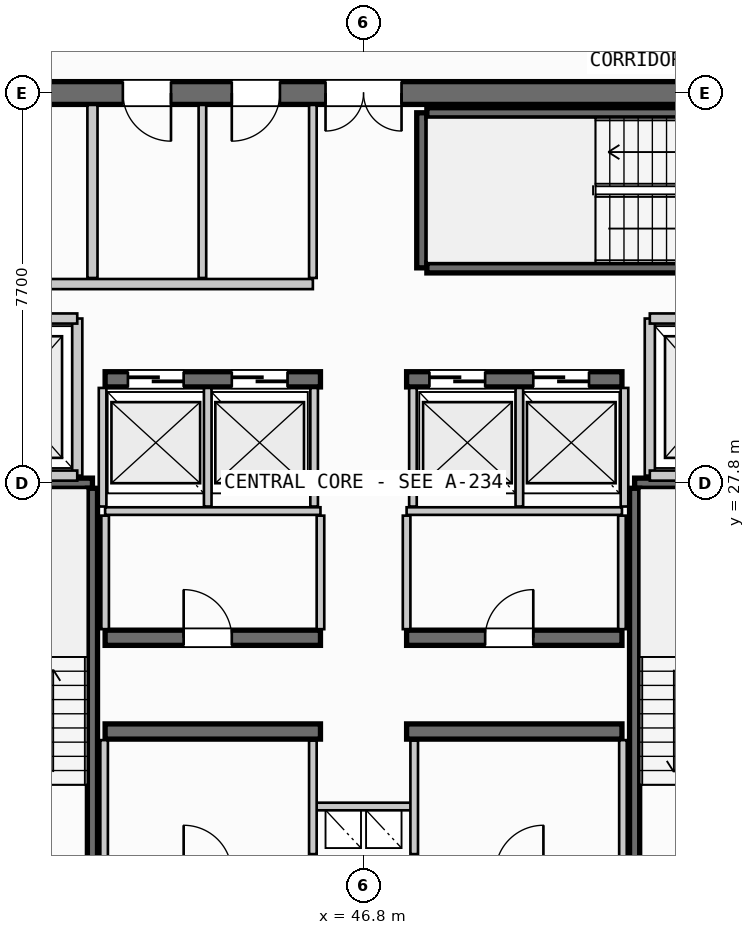
"""IFC4 building model, lengths in metres.
Left out: names, types, materials, properties, quantities, classifications, styles, units other than length and angle.
Written with IfcOpenShell. Run it as: python <this file> out.ifc"""

import sys

from ifc_helpers import new_model, si_unit, direction, frame, frame_2d, origin, place, context, subcontext, project, spatial, rectangle, extrude, source, transform, mapped, element, fill, save


model = new_model("IFC4")
c1 = context("Model", 3, precision=1e-05, world=origin(), true_north=direction((0.0, 1.0)))
c2 = subcontext(c1, "Body", "Model", "MODEL_VIEW")
j1 = project(units=[si_unit("LENGTHUNIT", "METRE"), si_unit("PLANEANGLEUNIT", "RADIAN")], contexts=[c1])
p1 = place(None, origin())
s1 = spatial("IfcSite", under=j1, at=p1, CompositionType="ELEMENT")
p2 = place(p1, origin())
s2 = spatial("IfcBuilding", under=s1, at=p2, CompositionType="ELEMENT")
p3 = place(p2, frame((0.0, 0.0, 249.1)))
s3 = spatial("IfcBuildingStorey", under=s2, at=p3, CompositionType="ELEMENT", Elevation=249.1)
p4 = place(p3, frame((55.6, 35.5, 0.0), z_axis=(0.0, 0.0, 1.0), x_axis=(-1.0, 0.0, 0.0)))
e1 = element("IfcWall", 1, at=p4, inside=s3, PredefinedType="SHEAR", context=c2, shape_type="SweptSolid", body=[
    extrude(rectangle(XDim=17.6, YDim=0.45, at=frame_2d((8.8, 0.0))), origin(), (0.0, 0.0, 1.0), 3.21),
])
p5 = place(p4, frame((8.05, 0.0, 0.0)))
e2 = element("IfcOpeningElement", 2, at=p5, cuts=e1, PredefinedType="OPENING", context=c2, shape_type="SweptSolid", body=[
    extrude(rectangle(XDim=1.5, YDim=2.2, at=frame_2d((0.75, 1.1))), frame((0.0, 0.235, 0.0), z_axis=(0.0, -1.0, 0.0), x_axis=(1.0, 0.0, 0.0)), (0.0, 0.0, 1.0), 0.47),
])
p6 = place(p4, frame((15.1, 0.0, 0.0)))
e3 = element("IfcOpeningElement", 3, at=p6, cuts=e1, PredefinedType="OPENING", context=c2, shape_type="SweptSolid", body=[
    extrude(rectangle(XDim=0.95, YDim=2.15, at=frame_2d((0.475, 1.075))), frame((0.0, 0.235, 0.0), z_axis=(0.0, -1.0, 0.0), x_axis=(1.0, 0.0, 0.0)), (0.0, 0.0, 1.0), 0.47),
])
p7 = place(p4, frame((12.6, 0.0, 0.0)))
e4 = element("IfcOpeningElement", 4, at=p7, cuts=e1, PredefinedType="OPENING", context=c2, shape_type="SweptSolid", body=[
    extrude(rectangle(XDim=0.95, YDim=2.15, at=frame_2d((0.475, 1.075))), frame((0.0, 0.235, 0.0), z_axis=(0.0, -1.0, 0.0), x_axis=(1.0, 0.0, 0.0)), (0.0, 0.0, 1.0), 0.47),
])
p8 = place(p4, frame((10.45, 0.0, 0.0)))
e5 = element("IfcOpeningElement", 5, at=p8, cuts=e1, PredefinedType="OPENING", context=c2, shape_type="SweptSolid", body=[
    extrude(rectangle(XDim=0.95, YDim=2.15, at=frame_2d((0.475, 1.075))), frame((0.0, 0.235, 0.0), z_axis=(0.0, -1.0, 0.0), x_axis=(1.0, 0.0, 0.0)), (0.0, 0.0, 1.0), 0.47),
])
for number, where, z_axis, x_axis in (
    (6, (41.7, 22.9, 0.0), (0.0, 0.0, 1.0), (1.0, 0.0, 0.0)),
    (7, (47.65, 22.9, 0.0), (0.0, 0.0, 1.0), (1.0, 0.0, 0.0)),
):
    element("IfcWall", number, at=place(p3, frame(where, z_axis=z_axis, x_axis=x_axis)), inside=s3, PredefinedType="SHEAR", context=c2, shape_type="SweptSolid", body=[
        extrude(rectangle(XDim=4.25, YDim=0.3, at=frame_2d((2.125, 0.0))), origin(), (0.0, 0.0, 1.0), 3.21),
    ])
p9 = place(p3, frame((41.7, 24.75, 0.0), z_axis=(0.0, 0.0, 1.0), x_axis=(1.0, 0.0, 0.0)))
e8 = element("IfcWall", 8, at=p9, inside=s3, PredefinedType="SHEAR", context=c2, shape_type="SweptSolid", body=[
    extrude(rectangle(XDim=4.25, YDim=0.3, at=frame_2d((2.125, 0.0))), origin(), (0.0, 0.0, 1.0), 3.21),
])
p10 = place(p9, frame((1.55, 0.0, 0.0)))
e9 = element("IfcOpeningElement", 9, at=p10, cuts=e8, PredefinedType="OPENING", context=c2, shape_type="SweptSolid", body=[
    extrude(rectangle(XDim=0.95, YDim=2.15, at=frame_2d((0.475, 1.075))), frame((0.0, 0.16, 0.0), z_axis=(0.0, -1.0, 0.0), x_axis=(1.0, 0.0, 0.0)), (0.0, 0.0, 1.0), 0.32),
])
p11 = place(p3, frame((47.65, 24.75, 0.0), z_axis=(0.0, 0.0, 1.0), x_axis=(1.0, 0.0, 0.0)))
e10 = element("IfcWall", 10, at=p11, inside=s3, PredefinedType="SHEAR", context=c2, shape_type="SweptSolid", body=[
    extrude(rectangle(XDim=4.25, YDim=0.3, at=frame_2d((2.125, 0.0))), origin(), (0.0, 0.0, 1.0), 3.21),
])
p12 = place(p11, frame((1.55, 0.0, 0.0)))
e11 = element("IfcOpeningElement", 11, at=p12, cuts=e10, PredefinedType="OPENING", context=c2, shape_type="SweptSolid", body=[
    extrude(rectangle(XDim=0.95, YDim=2.15, at=frame_2d((0.475, 1.075))), frame((0.0, 0.16, 0.0), z_axis=(0.0, -1.0, 0.0), x_axis=(1.0, 0.0, 0.0)), (0.0, 0.0, 1.0), 0.32),
])
p13 = place(p3, frame((41.7, 29.85, 0.0), z_axis=(0.0, 0.0, 1.0), x_axis=(1.0, 0.0, 0.0)))
e12 = element("IfcWall", 12, at=p13, inside=s3, PredefinedType="SHEAR", context=c2, shape_type="SweptSolid", body=[
    extrude(rectangle(XDim=4.25, YDim=0.3, at=frame_2d((2.125, 0.0))), origin(), (0.0, 0.0, 1.0), 3.21),
])
p14 = place(p13, frame((0.45, 0.0, 0.0)))
e13 = element("IfcOpeningElement", 13, at=p14, cuts=e12, PredefinedType="OPENING", context=c2, shape_type="SweptSolid", body=[
    extrude(rectangle(XDim=1.1, YDim=2.2, at=frame_2d((0.55, 1.1))), frame((0.0, 0.16, 0.0), z_axis=(0.0, -1.0, 0.0), x_axis=(1.0, 0.0, 0.0)), (0.0, 0.0, 1.0), 0.32),
])
p15 = place(p13, frame((2.5, 0.0, 0.0)))
e14 = element("IfcOpeningElement", 14, at=p15, cuts=e12, PredefinedType="OPENING", context=c2, shape_type="SweptSolid", body=[
    extrude(rectangle(XDim=1.1, YDim=2.2, at=frame_2d((0.55, 1.1))), frame((0.0, 0.16, 0.0), z_axis=(0.0, -1.0, 0.0), x_axis=(1.0, 0.0, 0.0)), (0.0, 0.0, 1.0), 0.32),
])
p16 = place(p3, frame((47.65, 29.85, 0.0), z_axis=(0.0, 0.0, 1.0), x_axis=(1.0, 0.0, 0.0)))
e15 = element("IfcWall", 15, at=p16, inside=s3, PredefinedType="SHEAR", context=c2, shape_type="SweptSolid", body=[
    extrude(rectangle(XDim=4.25, YDim=0.3, at=frame_2d((2.125, 0.0))), origin(), (0.0, 0.0, 1.0), 3.21),
])
p17 = place(p16, frame((0.45, 0.0, 0.0)))
e16 = element("IfcOpeningElement", 16, at=p17, cuts=e15, PredefinedType="OPENING", context=c2, shape_type="SweptSolid", body=[
    extrude(rectangle(XDim=1.1, YDim=2.2, at=frame_2d((0.55, 1.1))), frame((0.0, 0.16, 0.0), z_axis=(0.0, -1.0, 0.0), x_axis=(1.0, 0.0, 0.0)), (0.0, 0.0, 1.0), 0.32),
])
p18 = place(p16, frame((2.5, 0.0, 0.0)))
e17 = element("IfcOpeningElement", 17, at=p18, cuts=e15, PredefinedType="OPENING", context=c2, shape_type="SweptSolid", body=[
    extrude(rectangle(XDim=1.1, YDim=2.2, at=frame_2d((0.55, 1.1))), frame((0.0, 0.16, 0.0), z_axis=(0.0, -1.0, 0.0), x_axis=(1.0, 0.0, 0.0)), (0.0, 0.0, 1.0), 0.32),
])
p19 = place(p3, frame((38.39, 27.8, 0.0), z_axis=(0.0, 0.0, 1.0), x_axis=(1.0, 0.0, 0.0)))
e18 = element("IfcWall", 18, at=p19, inside=s3, PredefinedType="SHEAR", context=c2, shape_type="SweptSolid", body=[
    extrude(rectangle(XDim=3.06, YDim=0.2, at=frame_2d((1.53, 0.0))), origin(), (0.0, 0.0, 1.0), 3.21),
])
p20 = place(p3, frame((41.45, 27.7, 0.0), z_axis=(0.0, 0.0, 1.0), x_axis=(0.0, -1.0, 0.0)))
e19 = element("IfcWall", 19, at=p20, inside=s3, PredefinedType="SHEAR", context=c2, shape_type="SweptSolid", body=[
    extrude(rectangle(XDim=7.35, YDim=0.2, at=frame_2d((3.675, 0.0))), origin(), (0.0, 0.0, 1.0), 3.21),
])
p21 = place(p3, frame((52.15, 27.8, 0.0), z_axis=(0.0, 0.0, 1.0), x_axis=(1.0, 0.0, 0.0)))
e20 = element("IfcWall", 20, at=p21, inside=s3, PredefinedType="SHEAR", context=c2, shape_type="SweptSolid", body=[
    extrude(rectangle(XDim=3.06, YDim=0.2, at=frame_2d((1.53, 0.0))), origin(), (0.0, 0.0, 1.0), 3.21),
])
p22 = place(p3, frame((52.15, 20.35, 0.0), z_axis=(0.0, 0.0, 1.0), x_axis=(0.0, 1.0, 0.0)))
e21 = element("IfcWall", 21, at=p22, inside=s3, PredefinedType="SHEAR", context=c2, shape_type="SweptSolid", body=[
    extrude(rectangle(XDim=7.35, YDim=0.2, at=frame_2d((3.675, 0.0))), origin(), (0.0, 0.0, 1.0), 3.21),
])
p23 = place(p3, frame((47.95, 32.05, 0.0), z_axis=(0.0, 0.0, 1.0), x_axis=(0.0, 1.0, 0.0)))
e22 = element("IfcWall", 22, at=p23, inside=s3, PredefinedType="SHEAR", context=c2, shape_type="SweptSolid", body=[
    extrude(rectangle(XDim=3.06, YDim=0.2, at=frame_2d((1.53, 0.0))), origin(), (0.0, 0.0, 1.0), 3.21),
])
for number, where, z_axis, x_axis in (
    (23, (48.05, 35.11, 0.0), (0.0, 0.0, 1.0), (1.0, 0.0, 0.0)),
    (24, (55.4, 32.05, 0.0), (0.0, 0.0, 1.0), (-1.0, 0.0, 0.0)),
):
    element("IfcWall", number, at=place(p3, frame(where, z_axis=z_axis, x_axis=x_axis)), inside=s3, PredefinedType="SHEAR", context=c2, shape_type="SweptSolid", body=[
        extrude(rectangle(XDim=7.35, YDim=0.2, at=frame_2d((3.675, 0.0))), origin(), (0.0, 0.0, 1.0), 3.21),
    ])
p24 = place(p3, frame((45.8, 21.42, 0.0), z_axis=(0.0, 0.0, 1.0), x_axis=(1.0, 0.0, 0.0)))
e25 = element("IfcWall", 25, at=p24, inside=s3, PredefinedType="PARTITIONING", context=c2, shape_type="SweptSolid", body=[
    extrude(rectangle(XDim=2.0, YDim=0.15, at=frame_2d((1.0, 0.0))), origin(), (0.0, 0.0, 1.0), 2.28),
])
for number, where, z_axis, x_axis in (
    (26, (45.8, 20.48, 0.0), (0.0, 0.0, 1.0), (0.0, 1.0, 0.0)),
    (27, (47.8, 20.48, 0.0), (0.0, 0.0, 1.0), (0.0, 1.0, 0.0)),
):
    element("IfcWall", number, at=place(p3, frame(where, z_axis=z_axis, x_axis=x_axis)), inside=s3, PredefinedType="PARTITIONING", context=c2, shape_type="SweptSolid", body=[
        extrude(rectangle(XDim=2.24, YDim=0.15, at=frame_2d((1.12, 0.0))), origin(), (0.0, 0.0, 1.0), 2.28),
    ])
p25 = place(p3, frame((41.15, 27.95, 0.0), z_axis=(0.0, 0.0, 1.0), x_axis=(0.0, 1.0, 0.0)))
e28 = element("IfcWall", 28, at=p25, inside=s3, PredefinedType="PARTITIONING", context=c2, shape_type="SweptSolid", body=[
    extrude(rectangle(XDim=3.1, YDim=0.2, at=frame_2d((1.55, 0.0))), origin(), (0.0, 0.0, 1.0), 2.28),
])
for number, where, z_axis, x_axis in (
    (29, (38.235, 27.95, 0.0), (0.0, 0.0, 1.0), (1.0, 0.0, 0.0)),
    (30, (38.235, 31.05, 0.0), (0.0, 0.0, 1.0), (1.0, 0.0, 0.0)),
):
    element("IfcWall", number, at=place(p3, frame(where, z_axis=z_axis, x_axis=x_axis)), inside=s3, PredefinedType="PARTITIONING", context=c2, shape_type="SweptSolid", body=[
        extrude(rectangle(XDim=2.915, YDim=0.2, at=frame_2d((1.458, 0.0))), origin(), (0.0, 0.0, 1.0), 2.28),
    ])
p26 = place(p3, frame((52.45, 27.95, 0.0), z_axis=(0.0, 0.0, 1.0), x_axis=(0.0, 1.0, 0.0)))
e31 = element("IfcWall", 31, at=p26, inside=s3, PredefinedType="PARTITIONING", context=c2, shape_type="SweptSolid", body=[
    extrude(rectangle(XDim=3.1, YDim=0.2, at=frame_2d((1.55, 0.0))), origin(), (0.0, 0.0, 1.0), 2.28),
])
for number, where, z_axis, x_axis in (
    (32, (52.45, 27.95, 0.0), (0.0, 0.0, 1.0), (1.0, 0.0, 0.0)),
    (33, (52.45, 31.05, 0.0), (0.0, 0.0, 1.0), (1.0, 0.0, 0.0)),
):
    element("IfcWall", number, at=place(p3, frame(where, z_axis=z_axis, x_axis=x_axis)), inside=s3, PredefinedType="PARTITIONING", context=c2, shape_type="SweptSolid", body=[
        extrude(rectangle(XDim=2.915, YDim=0.2, at=frame_2d((1.458, 0.0))), origin(), (0.0, 0.0, 1.0), 2.28),
    ])
for number, where, z_axis, x_axis in (
    (34, (41.68, 20.335, 0.0), (0.0, 0.0, 1.0), (0.0, 1.0, 0.0)),
    (35, (51.92, 20.335, 0.0), (0.0, 0.0, 1.0), (0.0, 1.0, 0.0)),
):
    element("IfcWall", number, at=place(p3, frame(where, z_axis=z_axis, x_axis=x_axis)), inside=s3, PredefinedType="PARTITIONING", context=c2, shape_type="SweptSolid", body=[
        extrude(rectangle(XDim=2.395, YDim=0.15, at=frame_2d((1.198, 0.0))), origin(), (0.0, 0.0, 1.0), 2.28),
    ])
for number, where, z_axis, x_axis in (
    (36, (41.7, 27.25, 0.0), (0.0, 0.0, 1.0), (1.0, 0.0, 0.0)),
    (37, (47.65, 27.25, 0.0), (0.0, 0.0, 1.0), (1.0, 0.0, 0.0)),
):
    element("IfcWall", number, at=place(p3, frame(where, z_axis=z_axis, x_axis=x_axis)), inside=s3, PredefinedType="PARTITIONING", context=c2, shape_type="SweptSolid", body=[
        extrude(rectangle(XDim=4.25, YDim=0.15, at=frame_2d((2.125, 0.0))), origin(), (0.0, 0.0, 1.0), 2.28),
    ])
for number, where, z_axis, x_axis in (
    (38, (41.7, 24.92, 0.0), (0.0, 0.0, 1.0), (0.0, 1.0, 0.0)),
    (39, (45.95, 24.92, 0.0), (0.0, 0.0, 1.0), (0.0, 1.0, 0.0)),
    (40, (47.65, 24.92, 0.0), (0.0, 0.0, 1.0), (0.0, 1.0, 0.0)),
    (41, (51.9, 24.92, 0.0), (0.0, 0.0, 1.0), (0.0, 1.0, 0.0)),
):
    element("IfcWall", number, at=place(p3, frame(where, z_axis=z_axis, x_axis=x_axis)), inside=s3, PredefinedType="PARTITIONING", context=c2, shape_type="SweptSolid", body=[
        extrude(rectangle(XDim=2.24, YDim=0.15, at=frame_2d((1.12, 0.0))), origin(), (0.0, 0.0, 1.0), 2.28),
    ])
for number, where, z_axis, x_axis in (
    (42, (41.65, 27.34, 0.0), (0.0, 0.0, 1.0), (0.0, 1.0, 0.0)),
    (43, (43.725, 27.34, 0.0), (0.0, 0.0, 1.0), (0.0, 1.0, 0.0)),
    (44, (45.825, 27.34, 0.0), (0.0, 0.0, 1.0), (0.0, 1.0, 0.0)),
    (45, (47.775, 27.34, 0.0), (0.0, 0.0, 1.0), (0.0, 1.0, 0.0)),
    (46, (49.875, 27.34, 0.0), (0.0, 0.0, 1.0), (0.0, 1.0, 0.0)),
    (47, (51.95, 27.34, 0.0), (0.0, 0.0, 1.0), (0.0, 1.0, 0.0)),
):
    element("IfcWall", number, at=place(p3, frame(where, z_axis=z_axis, x_axis=x_axis)), inside=s3, PredefinedType="PARTITIONING", context=c2, shape_type="SweptSolid", body=[
        extrude(rectangle(XDim=2.34, YDim=0.15, at=frame_2d((1.17, 0.0))), origin(), (0.0, 0.0, 1.0), 2.28),
    ])
p27 = place(p3, frame((41.45, 31.85, 0.0), z_axis=(0.0, 0.0, 1.0), x_axis=(0.0, 1.0, 0.0)))
e48 = element("IfcWall", 48, at=p27, inside=s3, PredefinedType="PARTITIONING", context=c2, shape_type="SweptSolid", body=[
    extrude(rectangle(XDim=3.415, YDim=0.2, at=frame_2d((1.708, 0.0))), origin(), (0.0, 0.0, 1.0), 2.28),
])
p28 = place(p3, frame((38.235, 31.73, 0.0), z_axis=(0.0, 0.0, 1.0), x_axis=(1.0, 0.0, 0.0)))
e49 = element("IfcWall", 49, at=p28, inside=s3, PredefinedType="PARTITIONING", context=c2, shape_type="SweptSolid", body=[
    extrude(rectangle(XDim=7.565, YDim=0.2, at=frame_2d((3.782, 0.0))), origin(), (0.0, 0.0, 1.0), 2.28),
])
p29 = place(p3, frame((45.8, 31.85, 0.0), z_axis=(0.0, 0.0, 1.0), x_axis=(0.0, 1.0, 0.0)))
e50 = element("IfcWall", 50, at=p29, inside=s3, PredefinedType="PARTITIONING", context=c2, shape_type="SweptSolid", body=[
    extrude(rectangle(XDim=3.415, YDim=0.15, at=frame_2d((1.708, 0.0))), origin(), (0.0, 0.0, 1.0), 2.28),
])
p30 = place(p3, frame((43.62, 31.85, 0.0), z_axis=(0.0, 0.0, 1.0), x_axis=(0.0, 1.0, 0.0)))
e51 = element("IfcWall", 51, at=p30, inside=s3, PredefinedType="PLUMBINGWALL", context=c2, shape_type="SweptSolid", body=[
    extrude(rectangle(XDim=3.415, YDim=0.15, at=frame_2d((1.708, 0.0))), origin(), (0.0, 0.0, 1.0), 2.28),
])
m1 = source(origin(), c2, "Body", "SweptSolid", [
    extrude(rectangle(XDim=1.5, YDim=2.2, at=frame_2d((0.75, 1.1))), frame((0.0, 0.025, 0.0), z_axis=(0.0, -1.0, 0.0), x_axis=(1.0, 0.0, 0.0)), (0.0, 0.0, 1.0), 0.05),
])
p31 = place(p5, origin())
e52 = element("IfcDoor", 52, at=p31, inside=s3, OperationType="DOUBLE_DOOR_SINGLE_SWING", PredefinedType="DOOR", context=c2, shape_type="MappedRepresentation", body=[
    mapped(m1, transform((0.0, 0.0, 0.0), scale=1.0)),
])
fill(e2, e52)
m2 = source(origin(), c2, "Body", "SweptSolid", [
    extrude(rectangle(XDim=0.95, YDim=2.15, at=frame_2d((0.475, 1.075))), frame((0.0, 0.025, 0.0), z_axis=(0.0, -1.0, 0.0), x_axis=(1.0, 0.0, 0.0)), (0.0, 0.0, 1.0), 0.05),
])
p32 = place(p10, origin())
e53 = element("IfcDoor", 53, at=p32, inside=s3, OperationType="SINGLE_SWING_LEFT", PredefinedType="DOOR", context=c2, shape_type="MappedRepresentation", body=[
    mapped(m2, transform((0.0, 0.0, 0.0), scale=1.0)),
])
fill(e9, e53)
p33 = place(p12, origin())
e54 = element("IfcDoor", 54, at=p33, inside=s3, OperationType="SINGLE_SWING_RIGHT", PredefinedType="DOOR", context=c2, shape_type="MappedRepresentation", body=[
    mapped(m2, transform((0.0, 0.0, 0.0), scale=1.0)),
])
fill(e11, e54)
m3 = source(origin(), c2, "Body", "SweptSolid", [
    extrude(rectangle(XDim=1.1, YDim=2.2, at=frame_2d((0.55, 1.1))), frame((0.0, 0.025, 0.0), z_axis=(0.0, -1.0, 0.0), x_axis=(1.0, 0.0, 0.0)), (0.0, 0.0, 1.0), 0.05),
])
p34 = place(p14, origin())
e55 = element("IfcDoor", 55, at=p34, inside=s3, OperationType="SLIDING_TO_LEFT", PredefinedType="DOOR", context=c2, shape_type="MappedRepresentation", body=[
    mapped(m3, transform((0.0, 0.0, 0.0), scale=1.0)),
])
fill(e13, e55)
p35 = place(p15, origin())
e56 = element("IfcDoor", 56, at=p35, inside=s3, OperationType="SLIDING_TO_LEFT", PredefinedType="DOOR", context=c2, shape_type="MappedRepresentation", body=[
    mapped(m3, transform((0.0, 0.0, 0.0), scale=1.0)),
])
fill(e14, e56)
p36 = place(p17, origin())
e57 = element("IfcDoor", 57, at=p36, inside=s3, OperationType="SLIDING_TO_LEFT", PredefinedType="DOOR", context=c2, shape_type="MappedRepresentation", body=[
    mapped(m3, transform((0.0, 0.0, 0.0), scale=1.0)),
])
fill(e16, e57)
p37 = place(p18, origin())
e58 = element("IfcDoor", 58, at=p37, inside=s3, OperationType="SLIDING_TO_LEFT", PredefinedType="DOOR", context=c2, shape_type="MappedRepresentation", body=[
    mapped(m3, transform((0.0, 0.0, 0.0), scale=1.0)),
])
fill(e17, e58)
p38 = place(p7, origin())
e59 = element("IfcDoor", 59, at=p38, inside=s3, OperationType="SINGLE_SWING_LEFT", PredefinedType="DOOR", context=c2, shape_type="MappedRepresentation", body=[
    mapped(m2, transform((0.0, 0.0, 0.0), scale=1.0)),
])
fill(e4, e59)
p39 = place(p8, origin())
e60 = element("IfcDoor", 60, at=p39, inside=s3, OperationType="SINGLE_SWING_RIGHT", PredefinedType="DOOR", context=c2, shape_type="MappedRepresentation", body=[
    mapped(m2, transform((0.0, 0.0, 0.0), scale=1.0)),
])
fill(e5, e60)
save(model, sys.argv[1])
